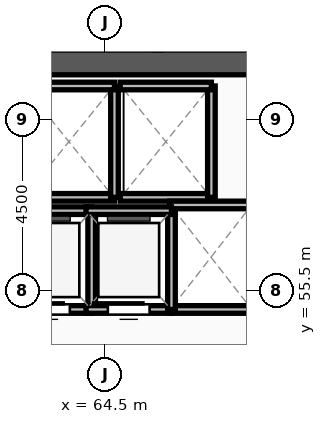
"""IFC4 building model, lengths in metres.
Left out: names, types, materials, properties, quantities, classifications, styles, units other than length and angle.
Written with IfcOpenShell. Run it as: python <this file> out.ifc"""

import sys

from ifc_helpers import new_model, si_unit, direction, frame, frame_2d, origin, place, context, subcontext, project, spatial, rectangle, extrude, source, transform, mapped, element, fill, save


model = new_model("IFC4")
c1 = context("Model", 3, precision=1e-05, world=origin(), true_north=direction((0.0, 1.0)))
c2 = subcontext(c1, "Body", "Model", "MODEL_VIEW")
j1 = project(units=[si_unit("LENGTHUNIT", "METRE"), si_unit("PLANEANGLEUNIT", "RADIAN")], contexts=[c1])
p1 = place(None, origin())
s1 = spatial("IfcSite", under=j1, at=p1, CompositionType="ELEMENT")
p2 = place(p1, origin())
s2 = spatial("IfcBuilding", under=s1, at=p2, CompositionType="ELEMENT")
p3 = place(p2, frame((0.0, 0.0, 224.25)))
s3 = spatial("IfcBuildingStorey", under=s2, at=p3, CompositionType="ELEMENT", Elevation=224.25)
p4 = place(p3, frame((60.675, 61.5, 0.0), z_axis=(0.0, 0.0, 1.0), x_axis=(1.0, 0.0, 0.0)))
e1 = element("IfcWall", 1, at=p4, inside=s3, PredefinedType="SHEAR", context=c2, shape_type="SweptSolid", body=[
    extrude(rectangle(XDim=7.65, YDim=0.65, at=frame_2d((3.825, 0.0))), origin(), (0.0, 0.0, 1.0), 3.57),
])
p5 = place(p3, frame((62.35, 57.95, 0.0), z_axis=(0.0, 0.0, 1.0), x_axis=(1.0, 0.0, 0.0)))
e2 = element("IfcWall", 2, at=p5, inside=s3, PredefinedType="SOLIDWALL", context=c2, shape_type="SweptSolid", body=[
    extrude(rectangle(XDim=2.4, YDim=0.2, at=frame_2d((1.2, 0.0))), origin(), (0.0, 0.0, 1.0), 3.57),
])
p6 = place(p3, frame((64.75, 57.95, 0.0), z_axis=(0.0, 0.0, 1.0), x_axis=(0.0, 1.0, 0.0)))
e3 = element("IfcWall", 3, at=p6, inside=s3, PredefinedType="SOLIDWALL", context=c2, shape_type="SweptSolid", body=[
    extrude(rectangle(XDim=2.93, YDim=0.2, at=frame_2d((1.465, 0.0))), origin(), (0.0, 0.0, 1.0), 3.57),
])
p7 = place(p3, frame((64.75, 60.88, 0.0), z_axis=(0.0, 0.0, 1.0), x_axis=(-1.0, 0.0, 0.0)))
e4 = element("IfcWall", 4, at=p7, inside=s3, PredefinedType="SOLIDWALL", context=c2, shape_type="SweptSolid", body=[
    extrude(rectangle(XDim=2.4, YDim=0.2, at=frame_2d((1.2, 0.0))), origin(), (0.0, 0.0, 1.0), 3.57),
])
p8 = place(p3, frame((64.9, 57.95, 0.0), z_axis=(0.0, 0.0, 1.0), x_axis=(1.0, 0.0, 0.0)))
e5 = element("IfcWall", 5, at=p8, inside=s3, PredefinedType="SOLIDWALL", context=c2, shape_type="SweptSolid", body=[
    extrude(rectangle(XDim=2.4, YDim=0.2, at=frame_2d((1.2, 0.0))), origin(), (0.0, 0.0, 1.0), 3.57),
])
p9 = place(p3, frame((67.3, 57.95, 0.0), z_axis=(0.0, 0.0, 1.0), x_axis=(0.0, 1.0, 0.0)))
e6 = element("IfcWall", 6, at=p9, inside=s3, PredefinedType="SOLIDWALL", context=c2, shape_type="SweptSolid", body=[
    extrude(rectangle(XDim=2.93, YDim=0.2, at=frame_2d((1.465, 0.0))), origin(), (0.0, 0.0, 1.0), 3.57),
])
p10 = place(p3, frame((67.3, 60.88, 0.0), z_axis=(0.0, 0.0, 1.0), x_axis=(-1.0, 0.0, 0.0)))
e7 = element("IfcWall", 7, at=p10, inside=s3, PredefinedType="SOLIDWALL", context=c2, shape_type="SweptSolid", body=[
    extrude(rectangle(XDim=2.4, YDim=0.2, at=frame_2d((1.2, 0.0))), origin(), (0.0, 0.0, 1.0), 3.57),
])
for number, where, z_axis, x_axis in (
    (8, (66.2, 55.0, 0.0), (0.0, 0.0, 1.0), (1.0, 0.0, 0.0)),
    (9, (68.38, 57.75, 0.0), (0.0, 0.0, 1.0), (-1.0, 0.0, 0.0)),
):
    element("IfcWall", number, at=place(p3, frame(where, z_axis=z_axis, x_axis=x_axis)), inside=s3, PredefinedType="SOLIDWALL", context=c2, shape_type="SweptSolid", body=[
        extrude(rectangle(XDim=2.18, YDim=0.2, at=frame_2d((1.09, 0.0))), origin(), (0.0, 0.0, 1.0), 3.57),
    ])
p11 = place(p3, frame((61.9, 55.0, 0.0), z_axis=(0.0, 0.0, 1.0), x_axis=(1.0, 0.0, 0.0)))
e10 = element("IfcWall", 10, at=p11, inside=s3, PredefinedType="SOLIDWALL", context=c2, shape_type="SweptSolid", body=[
    extrude(rectangle(XDim=2.25, YDim=0.2, at=frame_2d((1.125, 0.0))), origin(), (0.0, 0.0, 1.0), 3.57),
])
m1 = source(origin(), c2, "Body", "SweptSolid", [
    extrude(rectangle(XDim=1.1, YDim=2.2, at=frame_2d((0.55, 1.1))), frame((0.0, 0.11, 0.0), z_axis=(0.0, -1.0, 0.0), x_axis=(1.0, 0.0, 0.0)), (0.0, 0.0, 1.0), 0.22),
])
p12 = place(p11, frame((0.575, 0.0, 0.0)))
e11 = element("IfcOpeningElement", 11, at=p12, cuts=e10, PredefinedType="OPENING", context=c2, shape_type="MappedRepresentation", body=[
    mapped(m1, transform((0.0, 0.0, 0.0), x_axis=(1.0, 0.0, 0.0), y_axis=(0.0, 1.0, 0.0), z_axis=(0.0, 0.0, 1.0), scale=1.0)),
])
p13 = place(p3, frame((64.15, 55.0, 0.0), z_axis=(0.0, 0.0, 1.0), x_axis=(0.0, 1.0, 0.0)))
e12 = element("IfcWall", 12, at=p13, inside=s3, PredefinedType="SOLIDWALL", context=c2, shape_type="SweptSolid", body=[
    extrude(rectangle(XDim=2.6, YDim=0.2, at=frame_2d((1.3, 0.0))), origin(), (0.0, 0.0, 1.0), 3.57),
])
p14 = place(p3, frame((64.15, 57.6, 0.0), z_axis=(0.0, 0.0, 1.0), x_axis=(-1.0, 0.0, 0.0)))
e13 = element("IfcWall", 13, at=p14, inside=s3, PredefinedType="SOLIDWALL", context=c2, shape_type="SweptSolid", body=[
    extrude(rectangle(XDim=2.25, YDim=0.2, at=frame_2d((1.125, 0.0))), origin(), (0.0, 0.0, 1.0), 3.57),
])
p15 = place(p3, frame((64.0, 55.0, 0.0), z_axis=(0.0, 0.0, 1.0), x_axis=(1.0, 0.0, 0.0)))
e14 = element("IfcWall", 14, at=p15, inside=s3, PredefinedType="SOLIDWALL", context=c2, shape_type="SweptSolid", body=[
    extrude(rectangle(XDim=2.25, YDim=0.2, at=frame_2d((1.125, 0.0))), origin(), (0.0, 0.0, 1.0), 3.57),
])
p16 = place(p15, frame((0.575, 0.0, 0.0)))
e15 = element("IfcOpeningElement", 15, at=p16, cuts=e14, PredefinedType="OPENING", context=c2, shape_type="MappedRepresentation", body=[
    mapped(m1, transform((0.0, 0.0, 0.0), x_axis=(1.0, 0.0, 0.0), y_axis=(0.0, 1.0, 0.0), z_axis=(0.0, 0.0, 1.0), scale=1.0)),
])
p17 = place(p3, frame((66.25, 55.0, 0.0), z_axis=(0.0, 0.0, 1.0), x_axis=(0.0, 1.0, 0.0)))
e16 = element("IfcWall", 16, at=p17, inside=s3, PredefinedType="SOLIDWALL", context=c2, shape_type="SweptSolid", body=[
    extrude(rectangle(XDim=2.6, YDim=0.2, at=frame_2d((1.3, 0.0))), origin(), (0.0, 0.0, 1.0), 3.57),
])
p18 = place(p3, frame((66.25, 57.6, 0.0), z_axis=(0.0, 0.0, 1.0), x_axis=(-1.0, 0.0, 0.0)))
e17 = element("IfcWall", 17, at=p18, inside=s3, PredefinedType="SOLIDWALL", context=c2, shape_type="SweptSolid", body=[
    extrude(rectangle(XDim=2.25, YDim=0.2, at=frame_2d((1.125, 0.0))), origin(), (0.0, 0.0, 1.0), 3.57),
])
m2 = source(origin(), c2, "Body", "SweptSolid", [
    extrude(rectangle(XDim=1.1, YDim=2.2, at=frame_2d((0.55, 1.1))), frame((0.0, 0.025, 0.0), z_axis=(0.0, -1.0, 0.0), x_axis=(1.0, 0.0, 0.0)), (0.0, 0.0, 1.0), 0.05),
])
p19 = place(p12, origin())
e18 = element("IfcDoor", 18, at=p19, inside=s3, OperationType="SLIDING_TO_LEFT", PredefinedType="DOOR", context=c2, shape_type="MappedRepresentation", body=[
    mapped(m2, transform((0.0, 0.0, 0.0), x_axis=(1.0, 0.0, 0.0), y_axis=(0.0, 1.0, 0.0), z_axis=(0.0, 0.0, 1.0), scale=1.0)),
])
fill(e11, e18)
p20 = place(p16, origin())
e19 = element("IfcDoor", 19, at=p20, inside=s3, OperationType="SLIDING_TO_LEFT", PredefinedType="DOOR", context=c2, shape_type="MappedRepresentation", body=[
    mapped(m2, transform((0.0, 0.0, 0.0), x_axis=(1.0, 0.0, 0.0), y_axis=(0.0, 1.0, 0.0), z_axis=(0.0, 0.0, 1.0), scale=1.0)),
])
fill(e15, e19)
save(model, sys.argv[1])
